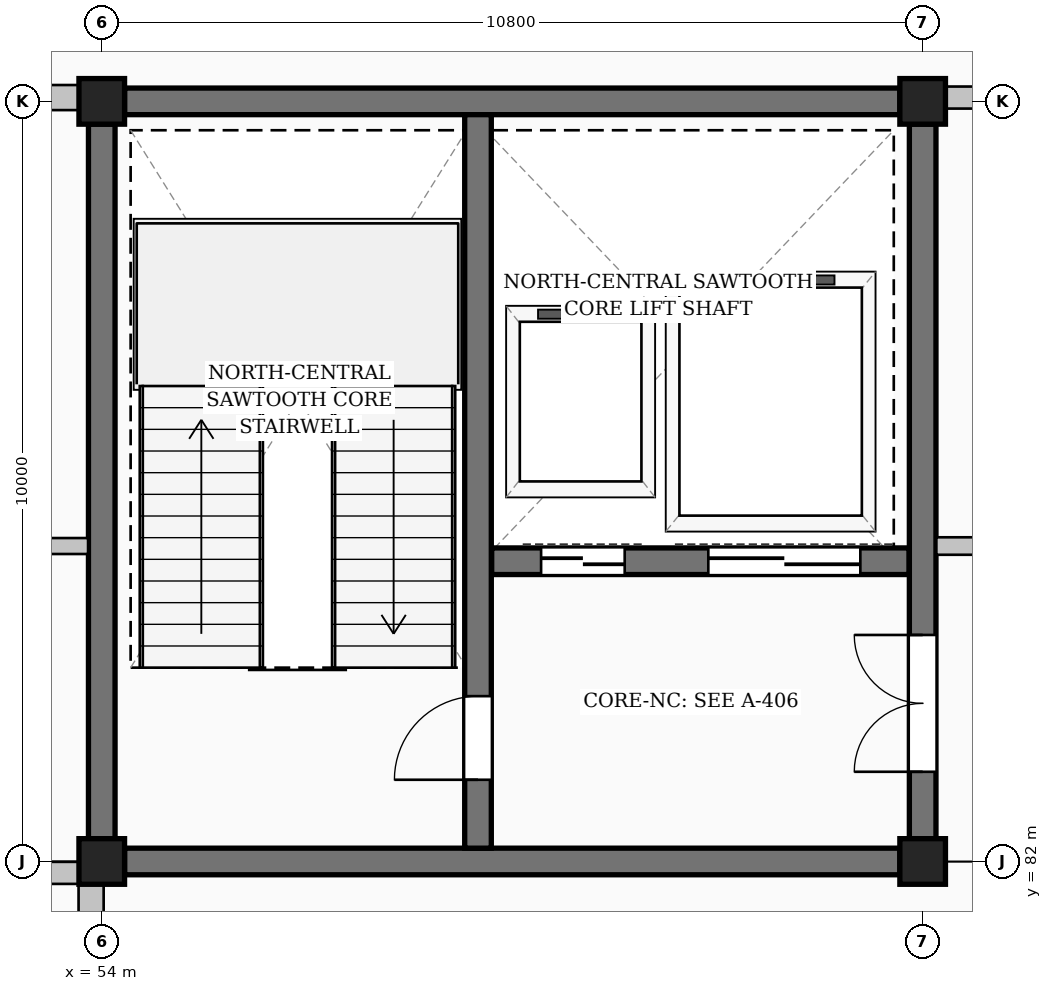
"""IFC4 building model, lengths in metres.
Left out: names, types, materials, properties, quantities, classifications, styles, units other than length and angle.
Written with IfcOpenShell. Run it as: python <this file> out.ifc"""

import sys

from ifc_helpers import new_model, si_unit, direction, frame, frame_2d, origin, origin_2d, place, context, subcontext, project, spatial, rectangle, extrude, element, fill, save


model = new_model("IFC4")
c1 = context("Model", 3, precision=1e-05, world=origin(), true_north=direction((0.0, 1.0)))
c2 = subcontext(c1, "Body", "Model", "MODEL_VIEW")
j1 = project(units=[si_unit("LENGTHUNIT", "METRE"), si_unit("PLANEANGLEUNIT", "RADIAN")], contexts=[c1])
p1 = place(None, origin())
s1 = spatial("IfcSite", under=j1, at=p1, CompositionType="ELEMENT")
p2 = place(p1, origin())
s2 = spatial("IfcBuilding", under=s1, at=p2, CompositionType="ELEMENT")
p3 = place(p2, frame((0.0, 0.0, 9.6)))
s3 = spatial("IfcBuildingStorey", under=s2, at=p3, CompositionType="ELEMENT", Elevation=9.6)
for number, where, z_axis, x_axis in (
    (1, (54.0, 82.0, 0.0), (0.0, 0.0, 1.0), (1.0, 0.0, 0.0)),
    (2, (54.0, 92.0, 0.0), (0.0, 0.0, 1.0), (1.0, 0.0, 0.0)),
    (3, (64.8, 82.0, 0.0), (0.0, 0.0, 1.0), (1.0, 0.0, 0.0)),
    (4, (64.8, 92.0, 0.0), (0.0, 0.0, 1.0), (1.0, 0.0, 0.0)),
):
    element("IfcColumn", number, at=place(p3, frame(where, z_axis=z_axis, x_axis=x_axis)), inside=s3, PredefinedType="COLUMN", context=c2, shape_type="SweptSolid", body=[
        extrude(rectangle(XDim=0.6, YDim=0.6, at=origin_2d()), origin(), (0.0, 0.0, 1.0), 4.8),
    ])
for number, where, z_axis, x_axis in (
    (5, (54.3, 82.0, 0.0), (0.0, 0.0, 1.0), (1.0, 0.0, 0.0)),
    (6, (54.3, 92.0, 0.0), (0.0, 0.0, 1.0), (1.0, 0.0, 0.0)),
):
    element("IfcWall", number, at=place(p3, frame(where, z_axis=z_axis, x_axis=x_axis)), inside=s3, PredefinedType="SHEAR", context=c2, shape_type="SweptSolid", body=[
        extrude(rectangle(XDim=10.2, YDim=0.35, at=frame_2d((5.1, 0.0))), origin(), (0.0, 0.0, 1.0), 4.56),
    ])
p4 = place(p3, frame((54.0, 82.3, 0.0), z_axis=(0.0, 0.0, 1.0), x_axis=(0.0, 1.0, 0.0)))
e7 = element("IfcWall", 7, at=p4, inside=s3, PredefinedType="SHEAR", context=c2, shape_type="SweptSolid", body=[
    extrude(rectangle(XDim=9.4, YDim=0.35, at=frame_2d((4.7, 0.0))), origin(), (0.0, 0.0, 1.0), 4.56),
])
p5 = place(p3, frame((64.8, 82.3, 0.0), z_axis=(0.0, 0.0, 1.0), x_axis=(0.0, 1.0, 0.0)))
e8 = element("IfcWall", 8, at=p5, inside=s3, PredefinedType="SHEAR", context=c2, shape_type="SweptSolid", body=[
    extrude(rectangle(XDim=9.4, YDim=0.35, at=frame_2d((4.7, 0.0))), origin(), (0.0, 0.0, 1.0), 4.56),
])
p6 = place(p5, frame((0.88, 0.0, 0.0)))
e9 = element("IfcOpeningElement", 9, at=p6, cuts=e8, PredefinedType="OPENING", context=c2, shape_type="SweptSolid", body=[
    extrude(rectangle(XDim=1.8, YDim=2.25, at=frame_2d((0.9, 1.125))), frame((0.0, 0.185, 0.0), z_axis=(0.0, -1.0, 0.0), x_axis=(1.0, 0.0, 0.0)), (0.0, 0.0, 1.0), 0.37),
])
p7 = place(p3, frame((58.95, 82.175, 0.0), z_axis=(0.0, 0.0, 1.0), x_axis=(0.0, 1.0, 0.0)))
e10 = element("IfcWall", 10, at=p7, inside=s3, PredefinedType="SHEAR", context=c2, shape_type="SweptSolid", body=[
    extrude(rectangle(XDim=9.65, YDim=0.35, at=frame_2d((4.825, 0.0))), origin(), (0.0, 0.0, 1.0), 4.56),
])
p8 = place(p7, frame((0.9, 0.0, 0.0)))
e11 = element("IfcOpeningElement", 11, at=p8, cuts=e10, PredefinedType="OPENING", context=c2, shape_type="SweptSolid", body=[
    extrude(rectangle(XDim=1.1, YDim=2.2, at=frame_2d((0.55, 1.1))), frame((0.0, 0.185, 0.0), z_axis=(0.0, -1.0, 0.0), x_axis=(1.0, 0.0, 0.0)), (0.0, 0.0, 1.0), 0.37),
])
p9 = place(p3, frame((59.13, 85.95, 0.0), z_axis=(0.0, 0.0, 1.0), x_axis=(1.0, 0.0, 0.0)))
e12 = element("IfcWall", 12, at=p9, inside=s3, PredefinedType="SHEAR", context=c2, shape_type="SweptSolid", body=[
    extrude(rectangle(XDim=5.49, YDim=0.35, at=frame_2d((2.745, 0.0))), origin(), (0.0, 0.0, 1.0), 4.56),
])
p10 = place(p9, frame((0.65, 0.0, 0.0)))
e13 = element("IfcOpeningElement", 13, at=p10, cuts=e12, PredefinedType="OPENING", context=c2, shape_type="SweptSolid", body=[
    extrude(rectangle(XDim=1.1, YDim=2.2, at=frame_2d((0.55, 1.1))), frame((0.0, 0.185, 0.0), z_axis=(0.0, -1.0, 0.0), x_axis=(1.0, 0.0, 0.0)), (0.0, 0.0, 1.0), 0.37),
])
p11 = place(p9, frame((2.85, 0.0, 0.0)))
e14 = element("IfcOpeningElement", 14, at=p11, cuts=e12, PredefinedType="OPENING", context=c2, shape_type="SweptSolid", body=[
    extrude(rectangle(XDim=2.0, YDim=2.5, at=frame_2d((1.0, 1.25))), frame((0.0, 0.185, 0.0), z_axis=(0.0, -1.0, 0.0), x_axis=(1.0, 0.0, 0.0)), (0.0, 0.0, 1.0), 0.37),
])
p12 = place(p3, frame((25.6, 86.15, 0.0), z_axis=(0.0, 0.0, 1.0), x_axis=(1.0, 0.0, 0.0)))
e15 = element("IfcWall", 15, at=p12, inside=s3, PredefinedType="PARTITIONING", context=c2, shape_type="SweptSolid", body=[
    extrude(rectangle(XDim=28.22, YDim=0.21, at=frame_2d((14.11, 0.0))), origin(), (0.0, 0.0, 1.0), 4.52),
])
p13 = place(p12, frame((13.535, 0.0, 0.0)))
e16 = element("IfcOpeningElement", 16, at=p13, cuts=e15, PredefinedType="OPENING", context=c2, shape_type="SweptSolid", body=[
    extrude(rectangle(XDim=1.15, YDim=2.25, at=frame_2d((0.575, 1.125))), frame((0.0, 0.115, 0.0), z_axis=(0.0, -1.0, 0.0), x_axis=(1.0, 0.0, 0.0)), (0.0, 0.0, 1.0), 0.23),
])
p14 = place(p3, frame((64.98, 86.15, 0.0), z_axis=(0.0, 0.0, 1.0), x_axis=(1.0, 0.0, 0.0)))
e17 = element("IfcWall", 17, at=p14, inside=s3, PredefinedType="PARTITIONING", context=c2, shape_type="SweptSolid", body=[
    extrude(rectangle(XDim=32.04, YDim=0.23, at=frame_2d((16.02, 0.0))), origin(), (0.0, 0.0, 1.0), 4.52),
])
p15 = place(p14, frame((15.395, 0.0, 0.0)))
e18 = element("IfcOpeningElement", 18, at=p15, cuts=e17, PredefinedType="OPENING", context=c2, shape_type="SweptSolid", body=[
    extrude(rectangle(XDim=1.25, YDim=2.3, at=frame_2d((0.625, 1.15))), frame((0.0, 0.125, 0.0), z_axis=(0.0, -1.0, 0.0), x_axis=(1.0, 0.0, 0.0)), (0.0, 0.0, 1.0), 0.25),
])
p16 = place(p3, frame((64.98, 92.05, 0.0), z_axis=(0.0, 0.0, 1.0), x_axis=(1.0, 0.0, 0.0)))
e19 = element("IfcWall", 19, at=p16, inside=s3, PredefinedType="PARTITIONING", context=c2, shape_type="SweptSolid", body=[
    extrude(rectangle(XDim=10.42, YDim=0.29, at=frame_2d((5.21, 0.0))), origin(), (0.0, 0.0, 1.0), 4.119),
])
p17 = place(p16, frame((4.485, 0.0, 0.0)))
e20 = element("IfcOpeningElement", 20, at=p17, cuts=e19, PredefinedType="OPENING", context=c2, shape_type="SweptSolid", body=[
    extrude(rectangle(XDim=1.45, YDim=2.35, at=frame_2d((0.725, 1.175))), frame((0.0, 0.155, 0.0), z_axis=(0.0, -1.0, 0.0), x_axis=(1.0, 0.0, 0.0)), (0.0, 0.0, 1.0), 0.31),
])
p18 = place(p3, frame((43.38, 81.85, 0.0), z_axis=(0.0, 0.0, 1.0), x_axis=(1.0, 0.0, 0.0)))
e21 = element("IfcWall", 21, at=p18, inside=s3, PredefinedType="PARTITIONING", context=c2, shape_type="SweptSolid", body=[
    extrude(rectangle(XDim=10.44, YDim=0.29, at=frame_2d((5.22, 0.0))), origin(), (0.0, 0.0, 1.0), 4.09),
])
p19 = place(p3, frame((43.38, 92.05, 0.0), z_axis=(0.0, 0.0, 1.0), x_axis=(1.0, 0.0, 0.0)))
e22 = element("IfcWall", 22, at=p19, inside=s3, PredefinedType="PARTITIONING", context=c2, shape_type="SweptSolid", body=[
    extrude(rectangle(XDim=10.44, YDim=0.33, at=frame_2d((5.22, 0.0))), origin(), (0.0, 0.0, 1.0), 4.119),
])
p20 = place(p3, frame((53.86, 72.2, 0.0), z_axis=(0.0, 0.0, 1.0), x_axis=(0.0, 1.0, 0.0)))
e23 = element("IfcWall", 23, at=p20, inside=s3, PredefinedType="PARTITIONING", context=c2, shape_type="SweptSolid", body=[
    extrude(rectangle(XDim=9.62, YDim=0.33, at=frame_2d((4.81, 0.0))), origin(), (0.0, 0.0, 1.0), 4.52),
])
p21 = place(p8, origin())
e24 = element("IfcDoor", 24, at=p21, inside=s3, OperationType="SINGLE_SWING_LEFT", PredefinedType="DOOR", context=c2, shape_type="SweptSolid", body=[
    extrude(rectangle(XDim=1.1, YDim=2.2, at=frame_2d((0.55, 1.1))), frame((0.0, 0.025, 0.0), z_axis=(0.0, -1.0, 0.0), x_axis=(1.0, 0.0, 0.0)), (0.0, 0.0, 1.0), 0.05),
])
fill(e11, e24)
p22 = place(p6, origin())
e25 = element("IfcDoor", 25, at=p22, inside=s3, OperationType="DOUBLE_DOOR_SINGLE_SWING", PredefinedType="DOOR", context=c2, shape_type="SweptSolid", body=[
    extrude(rectangle(XDim=1.8, YDim=2.25, at=frame_2d((0.9, 1.125))), frame((0.0, 0.025, 0.0), z_axis=(0.0, -1.0, 0.0), x_axis=(1.0, 0.0, 0.0)), (0.0, 0.0, 1.0), 0.05),
])
fill(e9, e25)
p23 = place(p10, origin())
e26 = element("IfcDoor", 26, at=p23, inside=s3, OperationType="DOUBLE_DOOR_SLIDING", PredefinedType="DOOR", context=c2, shape_type="SweptSolid", body=[
    extrude(rectangle(XDim=1.1, YDim=2.2, at=frame_2d((0.55, 1.1))), frame((0.0, 0.025, 0.0), z_axis=(0.0, -1.0, 0.0), x_axis=(1.0, 0.0, 0.0)), (0.0, 0.0, 1.0), 0.05),
])
fill(e13, e26)
p24 = place(p11, origin())
e27 = element("IfcDoor", 27, at=p24, inside=s3, OperationType="DOUBLE_DOOR_SLIDING", PredefinedType="DOOR", context=c2, shape_type="SweptSolid", body=[
    extrude(rectangle(XDim=2.0, YDim=2.5, at=frame_2d((1.0, 1.25))), frame((0.0, 0.025, 0.0), z_axis=(0.0, -1.0, 0.0), x_axis=(1.0, 0.0, 0.0)), (0.0, 0.0, 1.0), 0.05),
])
fill(e14, e27)
save(model, sys.argv[1])
